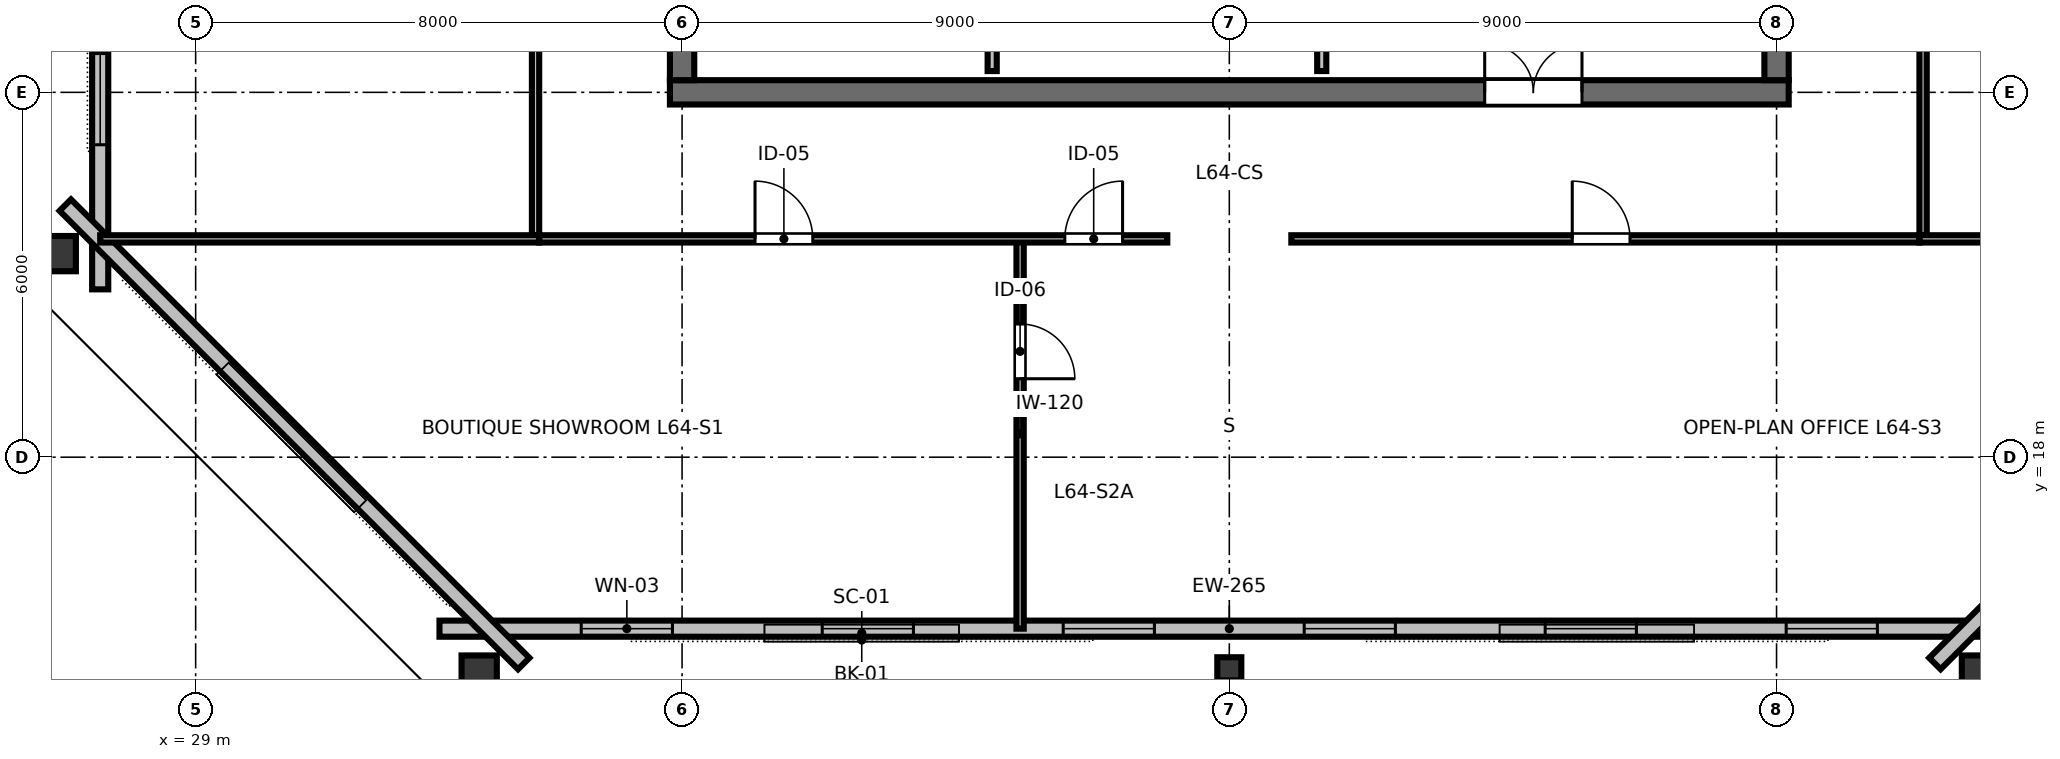
"""IFC4 building model, lengths in metres.
Left out: names, types, materials, properties, quantities, classifications, styles, units other than length and angle.
Written with IfcOpenShell. Run it as: python <this file> out.ifc"""

import sys

from ifc_helpers import new_model, si_unit, direction, frame, frame_2d, origin, origin_2d, place, context, subcontext, project, spatial, rectangle, hollow_rectangle, i_section, extrude, element, fill, save


model = new_model("IFC4")
c1 = context("Model", 3, precision=1e-05, world=origin(), true_north=direction((0.0, 1.0)))
c2 = subcontext(c1, "Body", "Model", "MODEL_VIEW")
j1 = project(units=[si_unit("LENGTHUNIT", "METRE"), si_unit("PLANEANGLEUNIT", "RADIAN")], contexts=[c1])
p1 = place(None, origin())
s1 = spatial("IfcSite", under=j1, at=p1, CompositionType="ELEMENT")
p2 = place(p1, origin())
s2 = spatial("IfcBuilding", under=s1, at=p2, CompositionType="ELEMENT")
p3 = place(p2, frame((0.0, 0.0, 243.0)))
s3 = spatial("IfcBuildingStorey", under=s2, at=p3, CompositionType="ELEMENT", Elevation=243.0)
p4 = place(p3, frame((36.8, 24.0, 0.0), z_axis=(0.0, 0.0, 1.0), x_axis=(1.0, 0.0, 0.0)))
e1 = element("IfcWall", 1, at=p4, inside=s3, PredefinedType="SHEAR", context=c2, shape_type="SweptSolid", body=[
    extrude(rectangle(XDim=18.4, YDim=0.4, at=frame_2d((9.2, 0.0))), origin(), (0.0, 0.0, 1.0), 3.36),
])
p5 = place(p4, frame((13.4, 0.0, 0.0)))
e2 = element("IfcOpeningElement", 2, at=p5, cuts=e1, PredefinedType="OPENING", context=c2, shape_type="SweptSolid", body=[
    extrude(rectangle(XDim=1.6, YDim=2.15, at=frame_2d((0.8, 1.075))), frame((0.0, 0.21, 0.0), z_axis=(0.0, -1.0, 0.0), x_axis=(1.0, 0.0, 0.0)), (0.0, 0.0, 1.0), 0.42),
])
p6 = place(p3, frame((37.0, 24.2, 0.0), z_axis=(0.0, 0.0, 1.0), x_axis=(0.0, 1.0, 0.0)))
e3 = element("IfcWall", 3, at=p6, inside=s3, PredefinedType="SHEAR", context=c2, shape_type="SweptSolid", body=[
    extrude(rectangle(XDim=15.6, YDim=0.4, at=frame_2d((7.8, 0.0))), origin(), (0.0, 0.0, 1.0), 3.36),
])
p7 = place(p6, frame((5.325, 0.0, 0.0)))
e4 = element("IfcOpeningElement", 4, at=p7, cuts=e3, PredefinedType="OPENING", context=c2, shape_type="SweptSolid", body=[
    extrude(rectangle(XDim=1.15, YDim=2.15, at=frame_2d((0.575, 1.075))), frame((0.0, 0.21, 0.0), z_axis=(0.0, -1.0, 0.0), x_axis=(1.0, 0.0, 0.0)), (0.0, 0.0, 1.0), 0.42),
])
p8 = place(p3, frame((55.0, 24.2, 0.0), z_axis=(0.0, 0.0, 1.0), x_axis=(0.0, 1.0, 0.0)))
e5 = element("IfcWall", 5, at=p8, inside=s3, PredefinedType="SHEAR", context=c2, shape_type="SweptSolid", body=[
    extrude(rectangle(XDim=15.6, YDim=0.4, at=frame_2d((7.8, 0.0))), origin(), (0.0, 0.0, 1.0), 3.36),
])
p9 = place(p8, frame((5.325, 0.0, 0.0)))
e6 = element("IfcOpeningElement", 6, at=p9, cuts=e5, PredefinedType="OPENING", context=c2, shape_type="SweptSolid", body=[
    extrude(rectangle(XDim=1.15, YDim=2.15, at=frame_2d((0.575, 1.075))), frame((0.0, 0.21, 0.0), z_axis=(0.0, -1.0, 0.0), x_axis=(1.0, 0.0, 0.0)), (0.0, 0.0, 1.0), 0.42),
])
p10 = place(p3, frame((33.663, 14.39, 0.0), z_axis=(0.0, 0.0, 1.0), x_axis=(1.0, 0.0, 0.0)))
e7 = element("IfcColumn", 7, at=p10, inside=s3, PredefinedType="COLUMN", context=c2, shape_type="SweptSolid", body=[
    extrude(hollow_rectangle(XDim=0.58, YDim=0.7, WallThickness=0.032, at=origin_2d()), origin(), (0.0, 0.0, 1.0), 3.373),
])
p11 = place(p3, frame((46.0, 14.52, 0.0), z_axis=(0.0, 0.0, 1.0), x_axis=(1.0, 0.0, 0.0)))
e8 = element("IfcColumn", 8, at=p11, inside=s3, PredefinedType="COLUMN", context=c2, shape_type="SweptSolid", body=[
    extrude(i_section(OverallWidth=0.395, OverallDepth=0.38, WebThickness=0.019, FlangeThickness=0.03, FilletRadius=0.025, at=origin_2d()), origin(), (0.0, 0.0, 1.0), 3.373),
])
for number, where, z_axis, x_axis in (
    (9, (58.337, 14.39, 0.0), (0.0, 0.0, 1.0), (1.0, 0.0, 0.0)),
    (10, (26.68, 21.348, 0.0), (0.0, 0.0, 1.0), (0.0, 1.0, 0.0)),
):
    element("IfcColumn", number, at=place(p3, frame(where, z_axis=z_axis, x_axis=x_axis)), inside=s3, PredefinedType="COLUMN", context=c2, shape_type="SweptSolid", body=[
        extrude(hollow_rectangle(XDim=0.58, YDim=0.7, WallThickness=0.032, at=origin_2d()), origin(), (0.0, 0.0, 1.0), 3.373),
    ])
p12 = place(p3, frame((33.01, 15.18, 0.0), z_axis=(0.0, 0.0, 1.0), x_axis=(1.0, 0.0, 0.0)))
e11 = element("IfcWall", 11, at=p12, inside=s3, PredefinedType="STANDARD", context=c2, shape_type="SweptSolid", body=[
    extrude(rectangle(XDim=25.98, YDim=0.265, at=frame_2d((12.99, 0.0))), origin(), (0.0, 0.0, 1.0), 3.375),
])
p13 = place(p12, frame((2.332, 0.0, 0.85)))
e12 = element("IfcOpeningElement", 12, at=p13, cuts=e11, PredefinedType="OPENING", context=c2, shape_type="SweptSolid", body=[
    extrude(rectangle(XDim=1.5, YDim=1.85, at=frame_2d((0.75, 0.925))), frame((0.0, 0.142, 0.0), z_axis=(0.0, -1.0, 0.0), x_axis=(1.0, 0.0, 0.0)), (0.0, 0.0, 1.0), 0.285),
])
p14 = place(p12, frame((6.295, 0.0, 0.85)))
e13 = element("IfcOpeningElement", 13, at=p14, cuts=e11, PredefinedType="OPENING", context=c2, shape_type="SweptSolid", body=[
    extrude(rectangle(XDim=1.5, YDim=1.85, at=frame_2d((0.75, 0.925))), frame((0.0, 0.142, 0.0), z_axis=(0.0, -1.0, 0.0), x_axis=(1.0, 0.0, 0.0)), (0.0, 0.0, 1.0), 0.285),
])
p15 = place(p12, frame((10.258, 0.0, 0.85)))
e14 = element("IfcOpeningElement", 14, at=p15, cuts=e11, PredefinedType="OPENING", context=c2, shape_type="SweptSolid", body=[
    extrude(rectangle(XDim=1.5, YDim=1.85, at=frame_2d((0.75, 0.925))), frame((0.0, 0.142, 0.0), z_axis=(0.0, -1.0, 0.0), x_axis=(1.0, 0.0, 0.0)), (0.0, 0.0, 1.0), 0.285),
])
p16 = place(p12, frame((14.222, 0.0, 0.85)))
e15 = element("IfcOpeningElement", 15, at=p16, cuts=e11, PredefinedType="OPENING", context=c2, shape_type="SweptSolid", body=[
    extrude(rectangle(XDim=1.5, YDim=1.85, at=frame_2d((0.75, 0.925))), frame((0.0, 0.142, 0.0), z_axis=(0.0, -1.0, 0.0), x_axis=(1.0, 0.0, 0.0)), (0.0, 0.0, 1.0), 0.285),
])
p17 = place(p12, frame((18.185, 0.0, 0.85)))
e16 = element("IfcOpeningElement", 16, at=p17, cuts=e11, PredefinedType="OPENING", context=c2, shape_type="SweptSolid", body=[
    extrude(rectangle(XDim=1.5, YDim=1.85, at=frame_2d((0.75, 0.925))), frame((0.0, 0.142, 0.0), z_axis=(0.0, -1.0, 0.0), x_axis=(1.0, 0.0, 0.0)), (0.0, 0.0, 1.0), 0.285),
])
p18 = place(p12, frame((22.148, 0.0, 0.85)))
e17 = element("IfcOpeningElement", 17, at=p18, cuts=e11, PredefinedType="OPENING", context=c2, shape_type="SweptSolid", body=[
    extrude(rectangle(XDim=1.5, YDim=1.85, at=frame_2d((0.75, 0.925))), frame((0.0, 0.142, 0.0), z_axis=(0.0, -1.0, 0.0), x_axis=(1.0, 0.0, 0.0)), (0.0, 0.0, 1.0), 0.285),
])
p19 = place(p3, frame((57.604, 14.606, 0.0), z_axis=(0.0, 0.0, 1.0), x_axis=(0.707106781187, 0.707106781187, 0.0)))
e18 = element("IfcWall", 18, at=p19, inside=s3, PredefinedType="STANDARD", context=c2, shape_type="SweptSolid", body=[
    extrude(rectangle(XDim=10.662, YDim=0.265, at=frame_2d((5.331, 0.0))), origin(), (0.0, 0.0, 1.0), 3.375),
])
p20 = place(p3, frame((27.43, 43.24, 0.0), z_axis=(0.0, 0.0, 1.0), x_axis=(0.0, -1.0, 0.0)))
e19 = element("IfcWall", 19, at=p20, inside=s3, PredefinedType="STANDARD", context=c2, shape_type="SweptSolid", body=[
    extrude(rectangle(XDim=22.48, YDim=0.265, at=frame_2d((11.24, 0.0))), origin(), (0.0, 0.0, 1.0), 3.375),
])
p21 = place(p20, frame((2.378, 0.0, 0.85)))
e20 = element("IfcOpeningElement", 20, at=p21, cuts=e19, PredefinedType="OPENING", context=c2, shape_type="SweptSolid", body=[
    extrude(rectangle(XDim=1.5, YDim=1.85, at=frame_2d((0.75, 0.925))), frame((0.0, 0.142, 0.0), z_axis=(0.0, -1.0, 0.0), x_axis=(1.0, 0.0, 0.0)), (0.0, 0.0, 1.0), 0.285),
])
p22 = place(p20, frame((6.434, 0.0, 0.85)))
e21 = element("IfcOpeningElement", 21, at=p22, cuts=e19, PredefinedType="OPENING", context=c2, shape_type="SweptSolid", body=[
    extrude(rectangle(XDim=1.5, YDim=1.85, at=frame_2d((0.75, 0.925))), frame((0.0, 0.142, 0.0), z_axis=(0.0, -1.0, 0.0), x_axis=(1.0, 0.0, 0.0)), (0.0, 0.0, 1.0), 0.285),
])
p23 = place(p20, frame((14.546, 0.0, 0.85)))
e22 = element("IfcOpeningElement", 22, at=p23, cuts=e19, PredefinedType="OPENING", context=c2, shape_type="SweptSolid", body=[
    extrude(rectangle(XDim=1.5, YDim=1.85, at=frame_2d((0.75, 0.925))), frame((0.0, 0.142, 0.0), z_axis=(0.0, -1.0, 0.0), x_axis=(1.0, 0.0, 0.0)), (0.0, 0.0, 1.0), 0.285),
])
p24 = place(p20, frame((18.602, 0.0, 0.85)))
e23 = element("IfcOpeningElement", 23, at=p24, cuts=e19, PredefinedType="OPENING", context=c2, shape_type="SweptSolid", body=[
    extrude(rectangle(XDim=1.5, YDim=1.85, at=frame_2d((0.75, 0.925))), frame((0.0, 0.142, 0.0), z_axis=(0.0, -1.0, 0.0), x_axis=(1.0, 0.0, 0.0)), (0.0, 0.0, 1.0), 0.285),
])
p25 = place(p3, frame((26.856, 22.146, 0.0), z_axis=(0.0, 0.0, 1.0), x_axis=(0.707106781187, -0.707106781187, 0.0)))
e24 = element("IfcWall", 24, at=p25, inside=s3, PredefinedType="STANDARD", context=c2, shape_type="SweptSolid", body=[
    extrude(rectangle(XDim=10.662, YDim=0.265, at=frame_2d((5.331, 0.0))), origin(), (0.0, 0.0, 1.0), 3.375),
])
p26 = place(p3, frame((42.1, 24.35, 0.0), z_axis=(0.0, 0.0, 1.0), x_axis=(0.0, 1.0, 0.0)))
e25 = element("IfcWall", 25, at=p26, inside=s3, PredefinedType="PARTITIONING", context=c2, shape_type="SweptSolid", body=[
    extrude(rectangle(XDim=3.9, YDim=0.15, at=frame_2d((1.95, 0.0))), origin(), (0.0, 0.0, 1.0), 3.375),
])
p27 = place(p26, frame((1.5, 0.0, 0.0)))
e26 = element("IfcOpeningElement", 26, at=p27, cuts=e25, PredefinedType="OPENING", context=c2, shape_type="SweptSolid", body=[
    extrude(rectangle(XDim=0.9, YDim=2.15, at=frame_2d((0.45, 1.075))), frame((0.0, 0.085, 0.0), z_axis=(0.0, -1.0, 0.0), x_axis=(1.0, 0.0, 0.0)), (0.0, 0.0, 1.0), 0.17),
])
p28 = place(p3, frame((47.52, 24.35, 0.0), z_axis=(0.0, 0.0, 1.0), x_axis=(0.0, 1.0, 0.0)))
e27 = element("IfcWall", 27, at=p28, inside=s3, PredefinedType="PARTITIONING", context=c2, shape_type="SweptSolid", body=[
    extrude(rectangle(XDim=3.9, YDim=0.15, at=frame_2d((1.95, 0.0))), origin(), (0.0, 0.0, 1.0), 3.375),
])
p29 = place(p28, frame((0.35, 0.0, 0.0)))
e28 = element("IfcOpeningElement", 28, at=p29, cuts=e27, PredefinedType="OPENING", context=c2, shape_type="SweptSolid", body=[
    extrude(rectangle(XDim=0.9, YDim=2.15, at=frame_2d((0.45, 1.075))), frame((0.0, 0.085, 0.0), z_axis=(0.0, -1.0, 0.0), x_axis=(1.0, 0.0, 0.0)), (0.0, 0.0, 1.0), 0.17),
])
p30 = place(p3, frame((42.559, 21.59, 0.0), z_axis=(0.0, 0.0, 1.0), x_axis=(0.0, -1.0, 0.0)))
e29 = element("IfcWall", 29, at=p30, inside=s3, PredefinedType="PARTITIONING", context=c2, shape_type="SweptSolid", body=[
    extrude(rectangle(XDim=6.41, YDim=0.12, at=frame_2d((3.205, 0.0))), origin(), (0.0, 0.0, 1.0), 2.655),
])
p31 = place(p30, frame((1.4, 0.0, 0.0)))
e30 = element("IfcOpeningElement", 30, at=p31, cuts=e29, PredefinedType="OPENING", context=c2, shape_type="SweptSolid", body=[
    extrude(rectangle(XDim=0.9, YDim=2.15, at=frame_2d((0.45, 1.075))), frame((0.0, 0.07, 0.0), z_axis=(0.0, -1.0, 0.0), x_axis=(1.0, 0.0, 0.0)), (0.0, 0.0, 1.0), 0.14),
])
p32 = place(p3, frame((34.65, 21.59, 0.0), z_axis=(0.0, 0.0, 1.0), x_axis=(1.0, 0.0, 0.0)))
e31 = element("IfcWall", 31, at=p32, inside=s3, PredefinedType="PARTITIONING", context=c2, shape_type="SweptSolid", body=[
    extrude(rectangle(XDim=10.33, YDim=0.12, at=frame_2d((5.165, 0.0))), origin(), (0.0, 0.0, 1.0), 2.655),
])
p33 = place(p32, frame((3.55, 0.0, 0.0)))
e32 = element("IfcOpeningElement", 32, at=p33, cuts=e31, PredefinedType="OPENING", context=c2, shape_type="SweptSolid", body=[
    extrude(rectangle(XDim=0.95, YDim=2.15, at=frame_2d((0.475, 1.075))), frame((0.0, 0.07, 0.0), z_axis=(0.0, -1.0, 0.0), x_axis=(1.0, 0.0, 0.0)), (0.0, 0.0, 1.0), 0.14),
])
p34 = place(p32, frame((8.645, 0.0, 0.0)))
e33 = element("IfcOpeningElement", 33, at=p34, cuts=e31, PredefinedType="OPENING", context=c2, shape_type="SweptSolid", body=[
    extrude(rectangle(XDim=0.95, YDim=2.15, at=frame_2d((0.475, 1.075))), frame((0.0, 0.07, 0.0), z_axis=(0.0, -1.0, 0.0), x_axis=(1.0, 0.0, 0.0)), (0.0, 0.0, 1.0), 0.14),
])
p35 = place(p3, frame((47.02, 21.59, 0.0), z_axis=(0.0, 0.0, 1.0), x_axis=(1.0, 0.0, 0.0)))
e34 = element("IfcWall", 34, at=p35, inside=s3, PredefinedType="PARTITIONING", context=c2, shape_type="SweptSolid", body=[
    extrude(rectangle(XDim=10.33, YDim=0.12, at=frame_2d((5.165, 0.0))), origin(), (0.0, 0.0, 1.0), 2.655),
])
p36 = place(p35, frame((4.62, 0.0, 0.0)))
e35 = element("IfcOpeningElement", 35, at=p36, cuts=e34, PredefinedType="OPENING", context=c2, shape_type="SweptSolid", body=[
    extrude(rectangle(XDim=0.95, YDim=2.15, at=frame_2d((0.475, 1.075))), frame((0.0, 0.07, 0.0), z_axis=(0.0, -1.0, 0.0), x_axis=(1.0, 0.0, 0.0)), (0.0, 0.0, 1.0), 0.14),
])
p37 = place(p3, frame((34.59, 21.65, 0.0), z_axis=(0.0, 0.0, 1.0), x_axis=(0.0, 1.0, 0.0)))
e36 = element("IfcWall", 36, at=p37, inside=s3, PredefinedType="PARTITIONING", context=c2, shape_type="SweptSolid", body=[
    extrude(rectangle(XDim=20.7, YDim=0.12, at=frame_2d((10.35, 0.0))), origin(), (0.0, 0.0, 1.0), 2.655),
])
p38 = place(p37, frame((4.26, 0.0, 0.0)))
e37 = element("IfcOpeningElement", 37, at=p38, cuts=e36, PredefinedType="OPENING", context=c2, shape_type="SweptSolid", body=[
    extrude(rectangle(XDim=0.95, YDim=2.15, at=frame_2d((0.475, 1.075))), frame((0.0, 0.07, 0.0), z_axis=(0.0, -1.0, 0.0), x_axis=(1.0, 0.0, 0.0)), (0.0, 0.0, 1.0), 0.14),
])
p39 = place(p37, frame((14.411, 0.0, 0.0)))
e38 = element("IfcOpeningElement", 38, at=p39, cuts=e36, PredefinedType="OPENING", context=c2, shape_type="SweptSolid", body=[
    extrude(rectangle(XDim=0.95, YDim=2.15, at=frame_2d((0.475, 1.075))), frame((0.0, 0.07, 0.0), z_axis=(0.0, -1.0, 0.0), x_axis=(1.0, 0.0, 0.0)), (0.0, 0.0, 1.0), 0.14),
])
p40 = place(p3, frame((57.41, 21.65, 0.0), z_axis=(0.0, 0.0, 1.0), x_axis=(0.0, 1.0, 0.0)))
e39 = element("IfcWall", 39, at=p40, inside=s3, PredefinedType="PARTITIONING", context=c2, shape_type="SweptSolid", body=[
    extrude(rectangle(XDim=20.7, YDim=0.12, at=frame_2d((10.35, 0.0))), origin(), (0.0, 0.0, 1.0), 2.655),
])
p41 = place(p40, frame((9.875, 0.0, 0.0)))
e40 = element("IfcOpeningElement", 40, at=p41, cuts=e39, PredefinedType="OPENING", context=c2, shape_type="SweptSolid", body=[
    extrude(rectangle(XDim=0.95, YDim=2.15, at=frame_2d((0.475, 1.075))), frame((0.0, 0.07, 0.0), z_axis=(0.0, -1.0, 0.0), x_axis=(1.0, 0.0, 0.0)), (0.0, 0.0, 1.0), 0.14),
])
for number, where, z_axis, x_axis in (
    (41, (34.65, 21.59, 0.0), (0.0, 0.0, 1.0), (-1.0, 0.0, 0.0)),
    (42, (57.35, 21.59, 0.0), (0.0, 0.0, 1.0), (1.0, 0.0, 0.0)),
):
    element("IfcWall", number, at=place(p3, frame(where, z_axis=z_axis, x_axis=x_axis)), inside=s3, PredefinedType="PARTITIONING", context=c2, shape_type="SweptSolid", body=[
        extrude(rectangle(XDim=7.22, YDim=0.12, at=frame_2d((3.61, 0.0))), origin(), (0.0, 0.0, 1.0), 2.655),
    ])
p42 = place(p13, origin())
e43 = element("IfcWindow", 43, at=p42, inside=s3, PartitioningType="SINGLE_PANEL", PredefinedType="WINDOW", context=c2, shape_type="SweptSolid", body=[
    extrude(rectangle(XDim=1.5, YDim=1.85, at=frame_2d((0.75, 0.925))), frame((0.0, 0.03, 0.0), z_axis=(0.0, -1.0, 0.0), x_axis=(1.0, 0.0, 0.0)), (0.0, 0.0, 1.0), 0.06),
])
fill(e12, e43)
p43 = place(p14, origin())
e44 = element("IfcWindow", 44, at=p43, inside=s3, PartitioningType="SINGLE_PANEL", PredefinedType="WINDOW", context=c2, shape_type="SweptSolid", body=[
    extrude(rectangle(XDim=1.5, YDim=1.85, at=frame_2d((0.75, 0.925))), frame((0.0, 0.03, 0.0), z_axis=(0.0, -1.0, 0.0), x_axis=(1.0, 0.0, 0.0)), (0.0, 0.0, 1.0), 0.06),
])
fill(e13, e44)
p44 = place(p15, origin())
e45 = element("IfcWindow", 45, at=p44, inside=s3, PartitioningType="SINGLE_PANEL", PredefinedType="WINDOW", context=c2, shape_type="SweptSolid", body=[
    extrude(rectangle(XDim=1.5, YDim=1.85, at=frame_2d((0.75, 0.925))), frame((0.0, 0.03, 0.0), z_axis=(0.0, -1.0, 0.0), x_axis=(1.0, 0.0, 0.0)), (0.0, 0.0, 1.0), 0.06),
])
fill(e14, e45)
p45 = place(p16, origin())
e46 = element("IfcWindow", 46, at=p45, inside=s3, PartitioningType="SINGLE_PANEL", PredefinedType="WINDOW", context=c2, shape_type="SweptSolid", body=[
    extrude(rectangle(XDim=1.5, YDim=1.85, at=frame_2d((0.75, 0.925))), frame((0.0, 0.03, 0.0), z_axis=(0.0, -1.0, 0.0), x_axis=(1.0, 0.0, 0.0)), (0.0, 0.0, 1.0), 0.06),
])
fill(e15, e46)
p46 = place(p17, origin())
e47 = element("IfcWindow", 47, at=p46, inside=s3, PartitioningType="SINGLE_PANEL", PredefinedType="WINDOW", context=c2, shape_type="SweptSolid", body=[
    extrude(rectangle(XDim=1.5, YDim=1.85, at=frame_2d((0.75, 0.925))), frame((0.0, 0.03, 0.0), z_axis=(0.0, -1.0, 0.0), x_axis=(1.0, 0.0, 0.0)), (0.0, 0.0, 1.0), 0.06),
])
fill(e16, e47)
p47 = place(p18, origin())
e48 = element("IfcWindow", 48, at=p47, inside=s3, PartitioningType="SINGLE_PANEL", PredefinedType="WINDOW", context=c2, shape_type="SweptSolid", body=[
    extrude(rectangle(XDim=1.5, YDim=1.85, at=frame_2d((0.75, 0.925))), frame((0.0, 0.03, 0.0), z_axis=(0.0, -1.0, 0.0), x_axis=(1.0, 0.0, 0.0)), (0.0, 0.0, 1.0), 0.06),
])
fill(e17, e48)
p48 = place(p24, origin())
e49 = element("IfcWindow", 49, at=p48, inside=s3, PartitioningType="SINGLE_PANEL", PredefinedType="WINDOW", context=c2, shape_type="SweptSolid", body=[
    extrude(rectangle(XDim=1.5, YDim=1.85, at=frame_2d((0.75, 0.925))), frame((0.0, 0.03, 0.0), z_axis=(0.0, -1.0, 0.0), x_axis=(1.0, 0.0, 0.0)), (0.0, 0.0, 1.0), 0.06),
])
fill(e23, e49)
p49 = place(p5, origin())
e50 = element("IfcDoor", 50, at=p49, inside=s3, OperationType="DOUBLE_DOOR_SINGLE_SWING", PredefinedType="DOOR", context=c2, shape_type="SweptSolid", body=[
    extrude(rectangle(XDim=1.6, YDim=2.15, at=frame_2d((0.8, 1.075))), frame((0.0, 0.025, 0.0), z_axis=(0.0, -1.0, 0.0), x_axis=(1.0, 0.0, 0.0)), (0.0, 0.0, 1.0), 0.05),
])
fill(e2, e50)
p50 = place(p31, origin())
e51 = element("IfcDoor", 51, at=p50, inside=s3, OperationType="SINGLE_SWING_RIGHT", PredefinedType="DOOR", context=c2, shape_type="SweptSolid", body=[
    extrude(rectangle(XDim=0.9, YDim=2.15, at=frame_2d((0.45, 1.075))), frame((0.0, 0.025, 0.0), z_axis=(0.0, -1.0, 0.0), x_axis=(1.0, 0.0, 0.0)), (0.0, 0.0, 1.0), 0.05),
])
fill(e30, e51)
p51 = place(p33, origin())
e52 = element("IfcDoor", 52, at=p51, inside=s3, OperationType="SINGLE_SWING_LEFT", PredefinedType="DOOR", context=c2, shape_type="SweptSolid", body=[
    extrude(rectangle(XDim=0.95, YDim=2.15, at=frame_2d((0.475, 1.075))), frame((0.0, 0.025, 0.0), z_axis=(0.0, -1.0, 0.0), x_axis=(1.0, 0.0, 0.0)), (0.0, 0.0, 1.0), 0.05),
])
fill(e32, e52)
p52 = place(p34, origin())
e53 = element("IfcDoor", 53, at=p52, inside=s3, OperationType="SINGLE_SWING_RIGHT", PredefinedType="DOOR", context=c2, shape_type="SweptSolid", body=[
    extrude(rectangle(XDim=0.95, YDim=2.15, at=frame_2d((0.475, 1.075))), frame((0.0, 0.025, 0.0), z_axis=(0.0, -1.0, 0.0), x_axis=(1.0, 0.0, 0.0)), (0.0, 0.0, 1.0), 0.05),
])
fill(e33, e53)
p53 = place(p36, origin())
e54 = element("IfcDoor", 54, at=p53, inside=s3, OperationType="SINGLE_SWING_LEFT", PredefinedType="DOOR", context=c2, shape_type="SweptSolid", body=[
    extrude(rectangle(XDim=0.95, YDim=2.15, at=frame_2d((0.475, 1.075))), frame((0.0, 0.025, 0.0), z_axis=(0.0, -1.0, 0.0), x_axis=(1.0, 0.0, 0.0)), (0.0, 0.0, 1.0), 0.05),
])
fill(e35, e54)
save(model, sys.argv[1])
